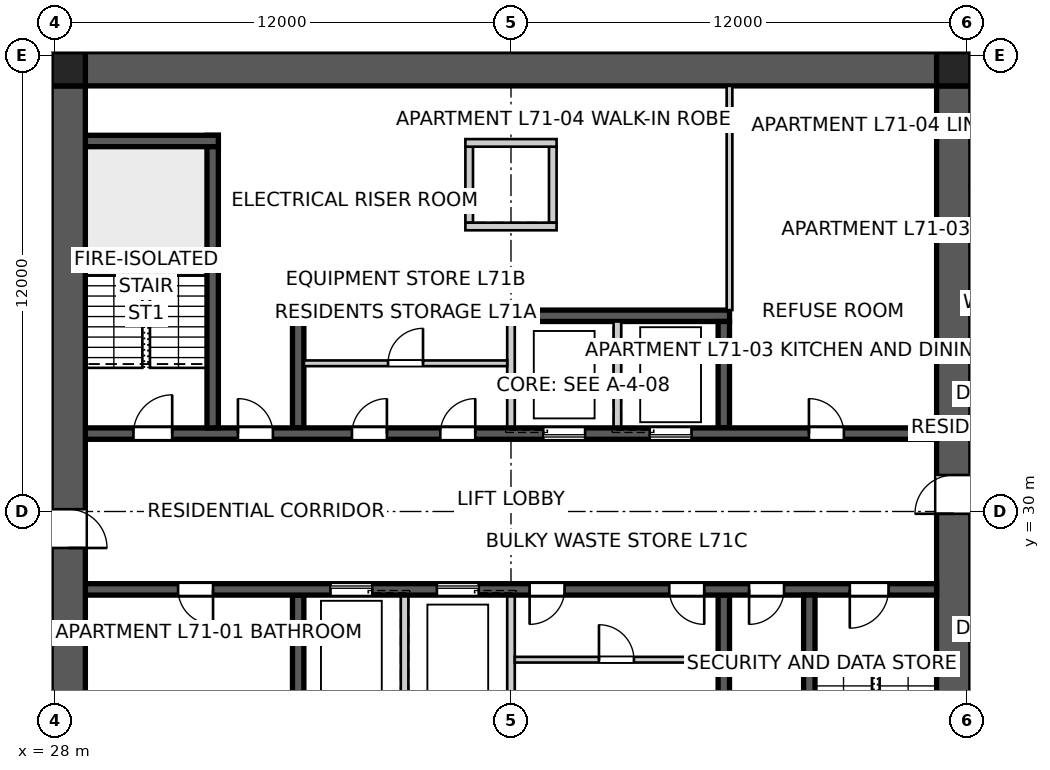
"""IFC4 building model, lengths in metres.
Left out: names, types, materials, properties, quantities, classifications, styles, units other than length and angle.
Written with IfcOpenShell. Run it as: python <this file> out.ifc"""

import sys

from ifc_helpers import new_model, si_unit, direction, frame, frame_2d, origin, origin_2d, place, context, subcontext, project, spatial, polyline, rectangle, outline, extrude, element, fill, save


model = new_model("IFC4")
c1 = context("Model", 3, precision=1e-05, world=origin(), true_north=direction((0.0, 1.0)))
c2 = subcontext(c1, "Body", "Model", "MODEL_VIEW")
j1 = project(units=[si_unit("LENGTHUNIT", "METRE"), si_unit("PLANEANGLEUNIT", "RADIAN")], contexts=[c1])
p1 = place(None, origin())
s1 = spatial("IfcSite", under=j1, at=p1, CompositionType="ELEMENT")
p2 = place(p1, origin())
s2 = spatial("IfcBuilding", under=s1, at=p2, CompositionType="ELEMENT")
p3 = place(p2, frame((0.0, 0.0, 257.4)))
s3 = spatial("IfcBuildingStorey", under=s2, at=p3, CompositionType="ELEMENT", Elevation=257.4)
p4 = place(p3, frame((28.8, 41.65, 0.0), z_axis=(0.0, 0.0, 1.0), x_axis=(1.0, 0.0, 0.0)))
e1 = element("IfcWall", 1, at=p4, inside=s3, PredefinedType="SHEAR", context=c2, shape_type="SweptSolid", body=[
    extrude(outline(polyline([(0.0, -0.45), (22.4, -0.45), (22.4, -0.025), (22.85, -0.025), (22.85, 0.025), (22.4, 0.025), (22.4, 0.45), (0.0, 0.45), (0.0, 0.025), (-0.45, 0.025), (-0.45, -0.025), (0.0, -0.025), (0.0, -0.45)])), origin(), (0.0, 0.0, 1.0), 3.4),
])
p5 = place(p3, frame((51.65, 18.8, 0.0), z_axis=(0.0, 0.0, 1.0), x_axis=(0.0, 1.0, 0.0)))
e2 = element("IfcWall", 2, at=p5, inside=s3, PredefinedType="SHEAR", context=c2, shape_type="SweptSolid", body=[
    extrude(outline(polyline([(0.0, -0.45), (22.4, -0.45), (22.4, -0.025), (22.85, -0.025), (22.85, 0.025), (22.4, 0.025), (22.4, 0.45), (0.0, 0.45), (0.0, 0.025), (-0.45, 0.025), (-0.45, -0.025), (0.0, -0.025), (0.0, -0.45)])), origin(), (0.0, 0.0, 1.0), 3.4),
])
p6 = place(p5, frame((11.14, 0.0, 0.0)))
e3 = element("IfcOpeningElement", 3, at=p6, cuts=e2, PredefinedType="OPENING", context=c2, shape_type="SweptSolid", body=[
    extrude(rectangle(XDim=1.02, YDim=2.4, at=frame_2d((0.51, 1.2))), frame((0.0, 0.46, 0.0), z_axis=(0.0, -1.0, 0.0), x_axis=(1.0, 0.0, 0.0)), (0.0, 0.0, 1.0), 0.92),
])
p7 = place(p3, frame((28.35, 41.2, 0.0), z_axis=(0.0, 0.0, 1.0), x_axis=(0.0, -1.0, 0.0)))
e4 = element("IfcWall", 4, at=p7, inside=s3, PredefinedType="SHEAR", context=c2, shape_type="SweptSolid", body=[
    extrude(outline(polyline([(0.0, -0.45), (22.4, -0.45), (22.4, -0.025), (22.85, -0.025), (22.85, 0.025), (22.4, 0.025), (22.4, 0.45), (0.0, 0.45), (0.0, 0.025), (-0.45, 0.025), (-0.45, -0.025), (0.0, -0.025), (0.0, -0.45)])), origin(), (0.0, 0.0, 1.0), 3.4),
])
p8 = place(p7, frame((11.14, 0.0, 0.0)))
e5 = element("IfcOpeningElement", 5, at=p8, cuts=e4, PredefinedType="OPENING", context=c2, shape_type="SweptSolid", body=[
    extrude(rectangle(XDim=1.02, YDim=2.4, at=frame_2d((0.51, 1.2))), frame((0.0, 0.46, 0.0), z_axis=(0.0, -1.0, 0.0), x_axis=(1.0, 0.0, 0.0)), (0.0, 0.0, 1.0), 0.92),
])
p9 = place(p3, frame((28.8, 32.05, 0.0), z_axis=(0.0, 0.0, 1.0), x_axis=(1.0, 0.0, 0.0)))
e6 = element("IfcWall", 6, at=p9, inside=s3, PredefinedType="SHEAR", context=c2, shape_type="SweptSolid", body=[
    extrude(rectangle(XDim=22.4, YDim=0.3, at=frame_2d((11.2, 0.0))), origin(), (0.0, 0.0, 1.0), 3.4),
])
p10 = place(p9, frame((19.04, 0.0, 0.0)))
e7 = element("IfcOpeningElement", 7, at=p10, cuts=e6, PredefinedType="OPENING", context=c2, shape_type="SweptSolid", body=[
    extrude(rectangle(XDim=0.92, YDim=2.1, at=frame_2d((0.46, 1.05))), frame((0.0, 0.16, 0.0), z_axis=(0.0, -1.0, 0.0), x_axis=(1.0, 0.0, 0.0)), (0.0, 0.0, 1.0), 0.32),
])
p11 = place(p9, frame((1.265, 0.0, 0.0)))
e8 = element("IfcOpeningElement", 8, at=p11, cuts=e6, PredefinedType="OPENING", context=c2, shape_type="SweptSolid", body=[
    extrude(rectangle(XDim=1.02, YDim=2.1, at=frame_2d((0.51, 1.05))), frame((0.0, 0.16, 0.0), z_axis=(0.0, -1.0, 0.0), x_axis=(1.0, 0.0, 0.0)), (0.0, 0.0, 1.0), 0.32),
])
p12 = place(p9, frame((4.015, 0.0, 0.0)))
e9 = element("IfcOpeningElement", 9, at=p12, cuts=e6, PredefinedType="OPENING", context=c2, shape_type="SweptSolid", body=[
    extrude(rectangle(XDim=0.92, YDim=2.1, at=frame_2d((0.46, 1.05))), frame((0.0, 0.16, 0.0), z_axis=(0.0, -1.0, 0.0), x_axis=(1.0, 0.0, 0.0)), (0.0, 0.0, 1.0), 0.32),
])
p13 = place(p9, frame((7.015, 0.0, 0.0)))
e10 = element("IfcOpeningElement", 10, at=p13, cuts=e6, PredefinedType="OPENING", context=c2, shape_type="SweptSolid", body=[
    extrude(rectangle(XDim=0.92, YDim=2.1, at=frame_2d((0.46, 1.05))), frame((0.0, 0.16, 0.0), z_axis=(0.0, -1.0, 0.0), x_axis=(1.0, 0.0, 0.0)), (0.0, 0.0, 1.0), 0.32),
])
p14 = place(p9, frame((9.34, 0.0, 0.0)))
e11 = element("IfcOpeningElement", 11, at=p14, cuts=e6, PredefinedType="OPENING", context=c2, shape_type="SweptSolid", body=[
    extrude(rectangle(XDim=0.92, YDim=2.1, at=frame_2d((0.46, 1.05))), frame((0.0, 0.16, 0.0), z_axis=(0.0, -1.0, 0.0), x_axis=(1.0, 0.0, 0.0)), (0.0, 0.0, 1.0), 0.32),
])
p15 = place(p9, frame((12.05, 0.0, 0.0)))
e12 = element("IfcOpeningElement", 12, at=p15, cuts=e6, PredefinedType="OPENING", context=c2, shape_type="SweptSolid", body=[
    extrude(rectangle(XDim=1.1, YDim=2.1, at=frame_2d((0.55, 1.05))), frame((0.0, 0.16, 0.0), z_axis=(0.0, -1.0, 0.0), x_axis=(1.0, 0.0, 0.0)), (0.0, 0.0, 1.0), 0.32),
])
p16 = place(p9, frame((14.85, 0.0, 0.0)))
e13 = element("IfcOpeningElement", 13, at=p16, cuts=e6, PredefinedType="OPENING", context=c2, shape_type="SweptSolid", body=[
    extrude(rectangle(XDim=1.1, YDim=2.1, at=frame_2d((0.55, 1.05))), frame((0.0, 0.16, 0.0), z_axis=(0.0, -1.0, 0.0), x_axis=(1.0, 0.0, 0.0)), (0.0, 0.0, 1.0), 0.32),
])
p17 = place(p3, frame((51.2, 27.95, 0.0), z_axis=(0.0, 0.0, 1.0), x_axis=(-1.0, 0.0, 0.0)))
e14 = element("IfcWall", 14, at=p17, inside=s3, PredefinedType="SHEAR", context=c2, shape_type="SweptSolid", body=[
    extrude(rectangle(XDim=22.4, YDim=0.3, at=frame_2d((11.2, 0.0))), origin(), (0.0, 0.0, 1.0), 3.4),
])
p18 = place(p17, frame((19.04, 0.0, 0.0)))
e15 = element("IfcOpeningElement", 15, at=p18, cuts=e14, PredefinedType="OPENING", context=c2, shape_type="SweptSolid", body=[
    extrude(rectangle(XDim=0.92, YDim=2.1, at=frame_2d((0.46, 1.05))), frame((0.0, 0.16, 0.0), z_axis=(0.0, -1.0, 0.0), x_axis=(1.0, 0.0, 0.0)), (0.0, 0.0, 1.0), 0.32),
])
p19 = place(p17, frame((1.265, 0.0, 0.0)))
e16 = element("IfcOpeningElement", 16, at=p19, cuts=e14, PredefinedType="OPENING", context=c2, shape_type="SweptSolid", body=[
    extrude(rectangle(XDim=1.02, YDim=2.1, at=frame_2d((0.51, 1.05))), frame((0.0, 0.16, 0.0), z_axis=(0.0, -1.0, 0.0), x_axis=(1.0, 0.0, 0.0)), (0.0, 0.0, 1.0), 0.32),
])
p20 = place(p17, frame((4.015, 0.0, 0.0)))
e17 = element("IfcOpeningElement", 17, at=p20, cuts=e14, PredefinedType="OPENING", context=c2, shape_type="SweptSolid", body=[
    extrude(rectangle(XDim=0.92, YDim=2.1, at=frame_2d((0.46, 1.05))), frame((0.0, 0.16, 0.0), z_axis=(0.0, -1.0, 0.0), x_axis=(1.0, 0.0, 0.0)), (0.0, 0.0, 1.0), 0.32),
])
p21 = place(p17, frame((9.79, 0.0, 0.0)))
e18 = element("IfcOpeningElement", 18, at=p21, cuts=e14, PredefinedType="OPENING", context=c2, shape_type="SweptSolid", body=[
    extrude(rectangle(XDim=0.92, YDim=2.1, at=frame_2d((0.46, 1.05))), frame((0.0, 0.16, 0.0), z_axis=(0.0, -1.0, 0.0), x_axis=(1.0, 0.0, 0.0)), (0.0, 0.0, 1.0), 0.32),
])
p22 = place(p17, frame((6.115, 0.0, 0.0)))
e19 = element("IfcOpeningElement", 19, at=p22, cuts=e14, PredefinedType="OPENING", context=c2, shape_type="SweptSolid", body=[
    extrude(rectangle(XDim=0.92, YDim=2.1, at=frame_2d((0.46, 1.05))), frame((0.0, 0.16, 0.0), z_axis=(0.0, -1.0, 0.0), x_axis=(1.0, 0.0, 0.0)), (0.0, 0.0, 1.0), 0.32),
])
p23 = place(p17, frame((12.05, 0.0, 0.0)))
e20 = element("IfcOpeningElement", 20, at=p23, cuts=e14, PredefinedType="OPENING", context=c2, shape_type="SweptSolid", body=[
    extrude(rectangle(XDim=1.1, YDim=2.1, at=frame_2d((0.55, 1.05))), frame((0.0, 0.16, 0.0), z_axis=(0.0, -1.0, 0.0), x_axis=(1.0, 0.0, 0.0)), (0.0, 0.0, 1.0), 0.32),
])
p24 = place(p17, frame((14.85, 0.0, 0.0)))
e21 = element("IfcOpeningElement", 21, at=p24, cuts=e14, PredefinedType="OPENING", context=c2, shape_type="SweptSolid", body=[
    extrude(rectangle(XDim=1.1, YDim=2.1, at=frame_2d((0.55, 1.05))), frame((0.0, 0.16, 0.0), z_axis=(0.0, -1.0, 0.0), x_axis=(1.0, 0.0, 0.0)), (0.0, 0.0, 1.0), 0.32),
])
p25 = place(p3, frame((34.25, 35.15, 0.0), z_axis=(0.0, 0.0, 1.0), x_axis=(1.0, 0.0, 0.0)))
e22 = element("IfcWall", 22, at=p25, inside=s3, PredefinedType="SHEAR", context=c2, shape_type="SweptSolid", body=[
    extrude(rectangle(XDim=11.5, YDim=0.3, at=frame_2d((5.75, 0.0))), origin(), (0.0, 0.0, 1.0), 3.4),
])
for number, where, z_axis, x_axis in (
    (23, (34.4, 32.2, 0.0), (0.0, 0.0, 1.0), (0.0, 1.0, 0.0)),
    (24, (45.6, 27.8, 0.0), (0.0, 0.0, 1.0), (0.0, -1.0, 0.0)),
):
    element("IfcWall", number, at=place(p3, frame(where, z_axis=z_axis, x_axis=x_axis)), inside=s3, PredefinedType="SHEAR", context=c2, shape_type="SweptSolid", body=[
        extrude(rectangle(XDim=2.8, YDim=0.3, at=frame_2d((1.4, 0.0))), origin(), (0.0, 0.0, 1.0), 3.4),
    ])
for number, where, z_axis, x_axis in (
    (25, (40.0, 32.2, 0.0), (0.0, 0.0, 1.0), (0.0, 1.0, 0.0)),
    (26, (40.0, 27.8, 0.0), (0.0, 0.0, 1.0), (0.0, -1.0, 0.0)),
    (27, (42.8, 32.2, 0.0), (0.0, 0.0, 1.0), (0.0, 1.0, 0.0)),
    (28, (37.2, 27.8, 0.0), (0.0, 0.0, 1.0), (0.0, -1.0, 0.0)),
):
    element("IfcWall", number, at=place(p3, frame(where, z_axis=z_axis, x_axis=x_axis)), inside=s3, PredefinedType="SOLIDWALL", context=c2, shape_type="SweptSolid", body=[
        extrude(rectangle(XDim=2.8, YDim=0.2, at=frame_2d((1.4, 0.0))), origin(), (0.0, 0.0, 1.0), 3.4),
    ])
for number, where, z_axis, x_axis in (
    (29, (45.6, 32.2, 0.0), (0.0, 0.0, 1.0), (0.0, 1.0, 0.0)),
    (30, (34.4, 27.8, 0.0), (0.0, 0.0, 1.0), (0.0, -1.0, 0.0)),
):
    element("IfcWall", number, at=place(p3, frame(where, z_axis=z_axis, x_axis=x_axis)), inside=s3, PredefinedType="SHEAR", context=c2, shape_type="SweptSolid", body=[
        extrude(rectangle(XDim=2.8, YDim=0.3, at=frame_2d((1.4, 0.0))), origin(), (0.0, 0.0, 1.0), 3.4),
    ])
p26 = place(p3, frame((32.15, 32.2, 0.0), z_axis=(0.0, 0.0, 1.0), x_axis=(0.0, 1.0, 0.0)))
e31 = element("IfcWall", 31, at=p26, inside=s3, PredefinedType="SHEAR", context=c2, shape_type="SweptSolid", body=[
    extrude(rectangle(XDim=7.7, YDim=0.3, at=frame_2d((3.85, 0.0))), origin(), (0.0, 0.0, 1.0), 3.4),
])
p27 = place(p3, frame((28.8, 39.75, 0.0), z_axis=(0.0, 0.0, 1.0), x_axis=(1.0, 0.0, 0.0)))
e32 = element("IfcWall", 32, at=p27, inside=s3, PredefinedType="SHEAR", context=c2, shape_type="SweptSolid", body=[
    extrude(rectangle(XDim=3.5, YDim=0.3, at=frame_2d((1.75, 0.0))), origin(), (0.0, 0.0, 1.0), 3.4),
])
p28 = place(p3, frame((47.85, 27.8, 0.0), z_axis=(0.0, 0.0, 1.0), x_axis=(0.0, -1.0, 0.0)))
e33 = element("IfcWall", 33, at=p28, inside=s3, PredefinedType="SHEAR", context=c2, shape_type="SweptSolid", body=[
    extrude(rectangle(XDim=7.7, YDim=0.3, at=frame_2d((3.85, 0.0))), origin(), (0.0, 0.0, 1.0), 3.4),
])
for number, where, z_axis, x_axis in (
    (34, (38.9, 37.6, 0.0), (0.0, 0.0, 1.0), (0.0, 1.0, 0.0)),
    (35, (41.1, 37.6, 0.0), (0.0, 0.0, 1.0), (0.0, 1.0, 0.0)),
):
    element("IfcWall", number, at=place(p3, frame(where, z_axis=z_axis, x_axis=x_axis)), inside=s3, PredefinedType="SOLIDWALL", context=c2, shape_type="SweptSolid", body=[
        extrude(rectangle(XDim=2.0, YDim=0.2, at=frame_2d((1.0, 0.0))), origin(), (0.0, 0.0, 1.0), 3.4),
    ])
for number, where, z_axis, x_axis in (
    (36, (38.8, 37.5, 0.0), (0.0, 0.0, 1.0), (1.0, 0.0, 0.0)),
    (37, (38.8, 39.7, 0.0), (0.0, 0.0, 1.0), (1.0, 0.0, 0.0)),
):
    element("IfcWall", number, at=place(p3, frame(where, z_axis=z_axis, x_axis=x_axis)), inside=s3, PredefinedType="SOLIDWALL", context=c2, shape_type="SweptSolid", body=[
        extrude(rectangle(XDim=2.4, YDim=0.2, at=frame_2d((1.2, 0.0))), origin(), (0.0, 0.0, 1.0), 3.4),
    ])
for number, where, z_axis, x_axis in (
    (38, (51.65, 41.65, 0.0), (0.0, 0.0, 1.0), (1.0, 0.0, 0.0)),
    (39, (28.35, 41.65, 0.0), (0.0, 0.0, 1.0), (1.0, 0.0, 0.0)),
):
    element("IfcColumn", number, at=place(p3, frame(where, z_axis=z_axis, x_axis=x_axis)), inside=s3, PredefinedType="COLUMN", context=c2, shape_type="SweptSolid", body=[
        extrude(rectangle(XDim=0.9, YDim=0.9, at=origin_2d()), origin(), (0.0, 0.0, 1.0), 3.4),
    ])
p29 = place(p3, frame((57.612, 42.332, 0.0), z_axis=(0.0, 0.0, 1.0), x_axis=(-0.819161528122, -0.573562891796, 0.0)))
e40 = element("IfcWall", 40, at=p29, inside=s3, PredefinedType="PARTITIONING", context=c2, shape_type="SweptSolid", body=[
    extrude(rectangle(XDim=6.681, YDim=0.25, at=frame_2d((3.341, 0.0))), origin(), (0.0, 0.0, 1.0), 3.25),
])
p30 = place(p3, frame((45.75, 41.2, 0.0), z_axis=(0.0, 0.0, 1.0), x_axis=(0.0, -1.0, 0.0)))
e41 = element("IfcWall", 41, at=p30, inside=s3, PredefinedType="SOLIDWALL", context=c2, shape_type="SweptSolid", body=[
    extrude(rectangle(XDim=5.9, YDim=0.15, at=frame_2d((2.95, 0.0))), origin(), (0.0, 0.0, 1.0), 3.25),
])
p31 = place(p3, frame((27.9, 41.619, 0.0), z_axis=(0.0, 0.0, 1.0), x_axis=(0.999397924003, 0.034695669724, 0.0)))
e42 = element("IfcWall", 42, at=p31, inside=s3, PredefinedType="PARTITIONING", context=c2, shape_type="SweptSolid", body=[
    extrude(rectangle(XDim=0.901, YDim=0.12, at=frame_2d((0.45, 0.0))), origin(), (0.0, 0.0, 1.0), 3.25),
])
p32 = place(p3, frame((34.55, 33.9, 0.0), z_axis=(0.0, 0.0, 1.0), x_axis=(1.0, 0.0, 0.0)))
e43 = element("IfcWall", 43, at=p32, inside=s3, PredefinedType="SOLIDWALL", context=c2, shape_type="SweptSolid", body=[
    extrude(rectangle(XDim=5.35, YDim=0.15, at=frame_2d((2.675, 0.0))), origin(), (0.0, 0.0, 1.0), 3.25),
])
p33 = place(p32, frame((2.215, 0.0, 0.0)))
e44 = element("IfcOpeningElement", 44, at=p33, cuts=e43, PredefinedType="OPENING", context=c2, shape_type="SweptSolid", body=[
    extrude(rectangle(XDim=0.92, YDim=2.1, at=frame_2d((0.46, 1.05))), frame((0.0, 0.085, 0.0), z_axis=(0.0, -1.0, 0.0), x_axis=(1.0, 0.0, 0.0)), (0.0, 0.0, 1.0), 0.17),
])
p34 = place(p3, frame((40.1, 26.1, 0.0), z_axis=(0.0, 0.0, 1.0), x_axis=(1.0, 0.0, 0.0)))
e45 = element("IfcWall", 45, at=p34, inside=s3, PredefinedType="SOLIDWALL", context=c2, shape_type="SweptSolid", body=[
    extrude(rectangle(XDim=5.35, YDim=0.15, at=frame_2d((2.675, 0.0))), origin(), (0.0, 0.0, 1.0), 3.25),
])
p35 = place(p34, frame((2.215, 0.0, 0.0)))
e46 = element("IfcOpeningElement", 46, at=p35, cuts=e45, PredefinedType="OPENING", context=c2, shape_type="SweptSolid", body=[
    extrude(rectangle(XDim=0.92, YDim=2.1, at=frame_2d((0.46, 1.05))), frame((0.0, 0.085, 0.0), z_axis=(0.0, -1.0, 0.0), x_axis=(1.0, 0.0, 0.0)), (0.0, 0.0, 1.0), 0.17),
])
p36 = place(p10, origin())
e47 = element("IfcDoor", 47, at=p36, inside=s3, OperationType="SINGLE_SWING_LEFT", PredefinedType="DOOR", context=c2, shape_type="SweptSolid", body=[
    extrude(rectangle(XDim=0.92, YDim=2.1, at=frame_2d((0.46, 1.05))), frame((0.0, 0.025, 0.0), z_axis=(0.0, -1.0, 0.0), x_axis=(1.0, 0.0, 0.0)), (0.0, 0.0, 1.0), 0.05),
])
fill(e7, e47)
p37 = place(p18, origin())
e48 = element("IfcDoor", 48, at=p37, inside=s3, OperationType="SINGLE_SWING_LEFT", PredefinedType="DOOR", context=c2, shape_type="SweptSolid", body=[
    extrude(rectangle(XDim=0.92, YDim=2.1, at=frame_2d((0.46, 1.05))), frame((0.0, 0.025, 0.0), z_axis=(0.0, -1.0, 0.0), x_axis=(1.0, 0.0, 0.0)), (0.0, 0.0, 1.0), 0.05),
])
fill(e15, e48)
p38 = place(p19, origin())
e49 = element("IfcDoor", 49, at=p38, inside=s3, OperationType="SINGLE_SWING_RIGHT", PredefinedType="DOOR", context=c2, shape_type="SweptSolid", body=[
    extrude(rectangle(XDim=1.02, YDim=2.1, at=frame_2d((0.51, 1.05))), frame((0.0, 0.025, 0.0), z_axis=(0.0, -1.0, 0.0), x_axis=(1.0, 0.0, 0.0)), (0.0, 0.0, 1.0), 0.05),
])
fill(e16, e49)
p39 = place(p11, origin())
e50 = element("IfcDoor", 50, at=p39, inside=s3, OperationType="SINGLE_SWING_RIGHT", PredefinedType="DOOR", context=c2, shape_type="SweptSolid", body=[
    extrude(rectangle(XDim=1.02, YDim=2.1, at=frame_2d((0.51, 1.05))), frame((0.0, 0.025, 0.0), z_axis=(0.0, -1.0, 0.0), x_axis=(1.0, 0.0, 0.0)), (0.0, 0.0, 1.0), 0.05),
])
fill(e8, e50)
p40 = place(p12, origin())
e51 = element("IfcDoor", 51, at=p40, inside=s3, OperationType="SINGLE_SWING_LEFT", PredefinedType="DOOR", context=c2, shape_type="SweptSolid", body=[
    extrude(rectangle(XDim=0.92, YDim=2.1, at=frame_2d((0.46, 1.05))), frame((0.0, 0.025, 0.0), z_axis=(0.0, -1.0, 0.0), x_axis=(1.0, 0.0, 0.0)), (0.0, 0.0, 1.0), 0.05),
])
fill(e9, e51)
p41 = place(p20, origin())
e52 = element("IfcDoor", 52, at=p41, inside=s3, OperationType="SINGLE_SWING_RIGHT", PredefinedType="DOOR", context=c2, shape_type="SweptSolid", body=[
    extrude(rectangle(XDim=0.92, YDim=2.1, at=frame_2d((0.46, 1.05))), frame((0.0, 0.025, 0.0), z_axis=(0.0, -1.0, 0.0), x_axis=(1.0, 0.0, 0.0)), (0.0, 0.0, 1.0), 0.05),
])
fill(e17, e52)
p42 = place(p13, origin())
e53 = element("IfcDoor", 53, at=p42, inside=s3, OperationType="SINGLE_SWING_RIGHT", PredefinedType="DOOR", context=c2, shape_type="SweptSolid", body=[
    extrude(rectangle(XDim=0.92, YDim=2.1, at=frame_2d((0.46, 1.05))), frame((0.0, 0.025, 0.0), z_axis=(0.0, -1.0, 0.0), x_axis=(1.0, 0.0, 0.0)), (0.0, 0.0, 1.0), 0.05),
])
fill(e10, e53)
p43 = place(p14, origin())
e54 = element("IfcDoor", 54, at=p43, inside=s3, OperationType="SINGLE_SWING_RIGHT", PredefinedType="DOOR", context=c2, shape_type="SweptSolid", body=[
    extrude(rectangle(XDim=0.92, YDim=2.1, at=frame_2d((0.46, 1.05))), frame((0.0, 0.025, 0.0), z_axis=(0.0, -1.0, 0.0), x_axis=(1.0, 0.0, 0.0)), (0.0, 0.0, 1.0), 0.05),
])
fill(e11, e54)
p44 = place(p33, origin())
e55 = element("IfcDoor", 55, at=p44, inside=s3, OperationType="SINGLE_SWING_RIGHT", PredefinedType="DOOR", context=c2, shape_type="SweptSolid", body=[
    extrude(rectangle(XDim=0.92, YDim=2.1, at=frame_2d((0.46, 1.05))), frame((0.0, 0.025, 0.0), z_axis=(0.0, -1.0, 0.0), x_axis=(1.0, 0.0, 0.0)), (0.0, 0.0, 1.0), 0.05),
])
fill(e44, e55)
p45 = place(p21, origin())
e56 = element("IfcDoor", 56, at=p45, inside=s3, OperationType="SINGLE_SWING_RIGHT", PredefinedType="DOOR", context=c2, shape_type="SweptSolid", body=[
    extrude(rectangle(XDim=0.92, YDim=2.1, at=frame_2d((0.46, 1.05))), frame((0.0, 0.025, 0.0), z_axis=(0.0, -1.0, 0.0), x_axis=(1.0, 0.0, 0.0)), (0.0, 0.0, 1.0), 0.05),
])
fill(e18, e56)
p46 = place(p22, origin())
e57 = element("IfcDoor", 57, at=p46, inside=s3, OperationType="SINGLE_SWING_LEFT", PredefinedType="DOOR", context=c2, shape_type="SweptSolid", body=[
    extrude(rectangle(XDim=0.92, YDim=2.1, at=frame_2d((0.46, 1.05))), frame((0.0, 0.025, 0.0), z_axis=(0.0, -1.0, 0.0), x_axis=(1.0, 0.0, 0.0)), (0.0, 0.0, 1.0), 0.05),
])
fill(e19, e57)
p47 = place(p35, origin())
e58 = element("IfcDoor", 58, at=p47, inside=s3, OperationType="SINGLE_SWING_LEFT", PredefinedType="DOOR", context=c2, shape_type="SweptSolid", body=[
    extrude(rectangle(XDim=0.92, YDim=2.1, at=frame_2d((0.46, 1.05))), frame((0.0, 0.025, 0.0), z_axis=(0.0, -1.0, 0.0), x_axis=(1.0, 0.0, 0.0)), (0.0, 0.0, 1.0), 0.05),
])
fill(e46, e58)
p48 = place(p6, origin())
e59 = element("IfcDoor", 59, at=p48, inside=s3, OperationType="SINGLE_SWING_LEFT", PredefinedType="DOOR", context=c2, shape_type="SweptSolid", body=[
    extrude(rectangle(XDim=1.02, YDim=2.4, at=frame_2d((0.51, 1.2))), frame((0.0, 0.025, 0.0), z_axis=(0.0, -1.0, 0.0), x_axis=(1.0, 0.0, 0.0)), (0.0, 0.0, 1.0), 0.05),
])
fill(e3, e59)
p49 = place(p8, origin())
e60 = element("IfcDoor", 60, at=p49, inside=s3, OperationType="SINGLE_SWING_RIGHT", PredefinedType="DOOR", context=c2, shape_type="SweptSolid", body=[
    extrude(rectangle(XDim=1.02, YDim=2.4, at=frame_2d((0.51, 1.2))), frame((0.0, 0.025, 0.0), z_axis=(0.0, -1.0, 0.0), x_axis=(1.0, 0.0, 0.0)), (0.0, 0.0, 1.0), 0.05),
])
fill(e5, e60)
p50 = place(p15, origin())
e61 = element("IfcDoor", 61, at=p50, inside=s3, OperationType="SLIDING_TO_LEFT", PredefinedType="DOOR", context=c2, shape_type="SweptSolid", body=[
    extrude(rectangle(XDim=1.1, YDim=2.1, at=frame_2d((0.55, 1.05))), frame((0.0, 0.025, 0.0), z_axis=(0.0, -1.0, 0.0), x_axis=(1.0, 0.0, 0.0)), (0.0, 0.0, 1.0), 0.05),
])
fill(e12, e61)
p51 = place(p23, origin())
e62 = element("IfcDoor", 62, at=p51, inside=s3, OperationType="SLIDING_TO_LEFT", PredefinedType="DOOR", context=c2, shape_type="SweptSolid", body=[
    extrude(rectangle(XDim=1.1, YDim=2.1, at=frame_2d((0.55, 1.05))), frame((0.0, 0.025, 0.0), z_axis=(0.0, -1.0, 0.0), x_axis=(1.0, 0.0, 0.0)), (0.0, 0.0, 1.0), 0.05),
])
fill(e20, e62)
p52 = place(p16, origin())
e63 = element("IfcDoor", 63, at=p52, inside=s3, OperationType="SLIDING_TO_LEFT", PredefinedType="DOOR", context=c2, shape_type="SweptSolid", body=[
    extrude(rectangle(XDim=1.1, YDim=2.1, at=frame_2d((0.55, 1.05))), frame((0.0, 0.025, 0.0), z_axis=(0.0, -1.0, 0.0), x_axis=(1.0, 0.0, 0.0)), (0.0, 0.0, 1.0), 0.05),
])
fill(e13, e63)
p53 = place(p24, origin())
e64 = element("IfcDoor", 64, at=p53, inside=s3, OperationType="SLIDING_TO_LEFT", PredefinedType="DOOR", context=c2, shape_type="SweptSolid", body=[
    extrude(rectangle(XDim=1.1, YDim=2.1, at=frame_2d((0.55, 1.05))), frame((0.0, 0.025, 0.0), z_axis=(0.0, -1.0, 0.0), x_axis=(1.0, 0.0, 0.0)), (0.0, 0.0, 1.0), 0.05),
])
fill(e21, e64)
save(model, sys.argv[1])
